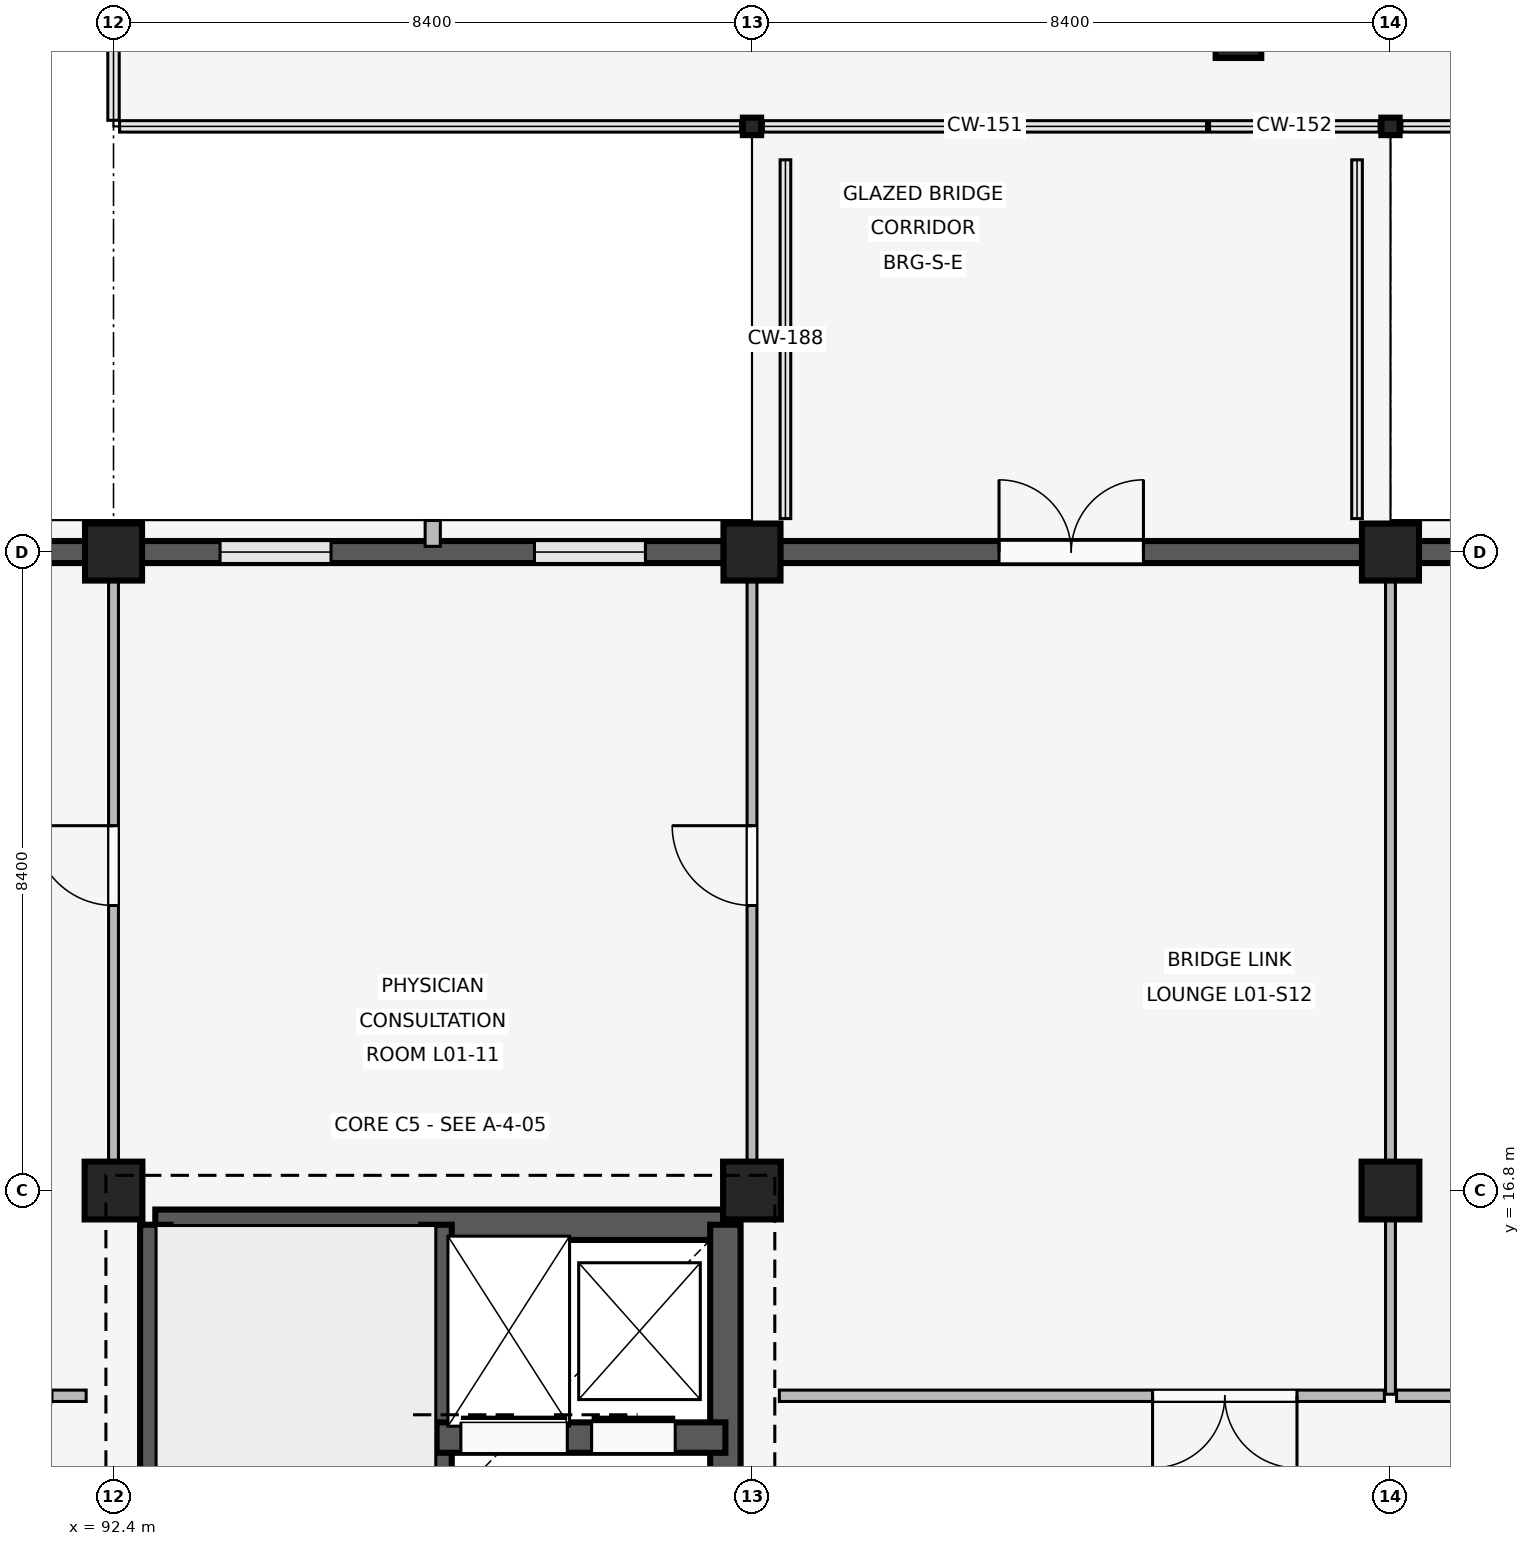
"""IFC4 building model, lengths in metres.
Left out: names, types, materials, properties, quantities, classifications, styles, units other than length and angle.
Written with IfcOpenShell. Run it as: python <this file> out.ifc"""

import sys

from ifc_helpers import new_model, si_unit, direction, frame, frame_2d, origin, origin_2d, place, context, subcontext, project, spatial, rectangle, i_section, extrude, element, fill, save


model = new_model("IFC4")
c1 = context("Model", 3, precision=1e-05, world=origin(), true_north=direction((0.0, 1.0)))
c2 = subcontext(c1, "Body", "Model", "MODEL_VIEW")
j1 = project(units=[si_unit("LENGTHUNIT", "METRE"), si_unit("PLANEANGLEUNIT", "RADIAN")], contexts=[c1])
p1 = place(None, origin())
s1 = spatial("IfcSite", under=j1, at=p1, CompositionType="ELEMENT")
p2 = place(p1, origin())
s2 = spatial("IfcBuilding", under=s1, at=p2, CompositionType="ELEMENT")
p3 = place(p2, frame((0.0, 0.0, 4.8)))
s3 = spatial("IfcBuildingStorey", under=s2, at=p3, CompositionType="ELEMENT", Elevation=4.8)
p4 = place(p3, frame((92.4, 16.8, 0.0), z_axis=(0.0, 0.0, 1.0), x_axis=(1.0, 0.0, 0.0)))
e1 = element("IfcColumn", 1, at=p4, inside=s3, PredefinedType="COLUMN", context=c2, shape_type="SweptSolid", body=[
    extrude(rectangle(XDim=0.76, YDim=0.76, at=origin_2d()), origin(), (0.0, 0.0, 1.0), 3.3),
])
p5 = place(p3, frame((92.4, 25.2, 0.0), z_axis=(0.0, 0.0, 1.0), x_axis=(1.0, 0.0, 0.0)))
e2 = element("IfcColumn", 2, at=p5, inside=s3, PredefinedType="COLUMN", context=c2, shape_type="SweptSolid", body=[
    extrude(rectangle(XDim=0.75, YDim=0.75, at=origin_2d()), origin(), (0.0, 0.0, 1.0), 3.3),
])
p6 = place(p3, frame((100.8, 16.8, 0.0), z_axis=(0.0, 0.0, 1.0), x_axis=(1.0, 0.0, 0.0)))
e3 = element("IfcColumn", 3, at=p6, inside=s3, PredefinedType="COLUMN", context=c2, shape_type="SweptSolid", body=[
    extrude(rectangle(XDim=0.76, YDim=0.76, at=origin_2d()), origin(), (0.0, 0.0, 1.0), 3.3),
])
p7 = place(p3, frame((100.8, 25.2, 0.0), z_axis=(0.0, 0.0, 1.0), x_axis=(1.0, 0.0, 0.0)))
e4 = element("IfcColumn", 4, at=p7, inside=s3, PredefinedType="COLUMN", context=c2, shape_type="SweptSolid", body=[
    extrude(rectangle(XDim=0.75, YDim=0.75, at=origin_2d()), origin(), (0.0, 0.0, 1.0), 3.3),
])
p8 = place(p3, frame((109.2, 16.8, 0.0), z_axis=(0.0, 0.0, 1.0), x_axis=(1.0, 0.0, 0.0)))
e5 = element("IfcColumn", 5, at=p8, inside=s3, PredefinedType="COLUMN", context=c2, shape_type="SweptSolid", body=[
    extrude(rectangle(XDim=0.76, YDim=0.76, at=origin_2d()), origin(), (0.0, 0.0, 1.0), 3.3),
])
p9 = place(p3, frame((109.2, 25.2, 0.0), z_axis=(0.0, 0.0, 1.0), x_axis=(1.0, 0.0, 0.0)))
e6 = element("IfcColumn", 6, at=p9, inside=s3, PredefinedType="COLUMN", context=c2, shape_type="SweptSolid", body=[
    extrude(rectangle(XDim=0.75, YDim=0.75, at=origin_2d()), origin(), (0.0, 0.0, 1.0), 3.3),
])
for number, where, z_axis, x_axis in (
    (7, (100.8, 30.8, 0.0), (0.0, 0.0, 1.0), (1.0, 0.0, 0.0)),
    (8, (109.2, 30.8, 0.0), (0.0, 0.0, 1.0), (1.0, 0.0, 0.0)),
):
    element("IfcColumn", number, at=place(p3, frame(where, z_axis=z_axis, x_axis=x_axis)), inside=s3, PredefinedType="COLUMN", context=c2, shape_type="SweptSolid", body=[
        extrude(i_section(OverallWidth=0.24, OverallDepth=0.23, WebThickness=0.008, FlangeThickness=0.012, at=origin_2d()), origin(), (0.0, 0.0, 1.0), 3.3),
    ])
p10 = place(p3, frame((107.2, 32.0, 0.0), z_axis=(0.0, 0.0, 1.0), x_axis=(1.0, 0.0, 0.0)))
e9 = element("IfcColumn", 9, at=p10, inside=s3, PredefinedType="COLUMN", context=c2, shape_type="SweptSolid", body=[
    extrude(rectangle(XDim=0.6, YDim=0.6, at=origin_2d()), origin(), (0.0, 0.0, 1.0), 3.3),
])
p11 = place(p3, frame((84.37, 25.2, 0.0), z_axis=(0.0, 0.0, 1.0), x_axis=(1.0, 0.0, 0.0)))
e10 = element("IfcWall", 10, at=p11, inside=s3, PredefinedType="SOLIDWALL", context=c2, shape_type="SweptSolid", body=[
    extrude(rectangle(XDim=7.66, YDim=0.29, at=frame_2d((3.83, 0.0))), origin(), (0.0, 0.0, 1.0), 2.42),
])
p12 = place(p11, frame((0.952, 0.0, 0.85)))
e11 = element("IfcOpeningElement", 11, at=p12, cuts=e10, PredefinedType="OPENING", context=c2, shape_type="SweptSolid", body=[
    extrude(rectangle(XDim=1.62, YDim=0.95, at=frame_2d((0.81, 0.475))), frame((0.0, 0.155, 0.0), z_axis=(0.0, -1.0, 0.0), x_axis=(1.0, 0.0, 0.0)), (0.0, 0.0, 1.0), 0.31),
])
p13 = place(p11, frame((5.088, 0.0, 0.85)))
e12 = element("IfcOpeningElement", 12, at=p13, cuts=e10, PredefinedType="OPENING", context=c2, shape_type="SweptSolid", body=[
    extrude(rectangle(XDim=1.62, YDim=0.95, at=frame_2d((0.81, 0.475))), frame((0.0, 0.155, 0.0), z_axis=(0.0, -1.0, 0.0), x_axis=(1.0, 0.0, 0.0)), (0.0, 0.0, 1.0), 0.31),
])
p14 = place(p3, frame((92.77, 25.2, 0.0), z_axis=(0.0, 0.0, 1.0), x_axis=(1.0, 0.0, 0.0)))
e13 = element("IfcWall", 13, at=p14, inside=s3, PredefinedType="SOLIDWALL", context=c2, shape_type="SweptSolid", body=[
    extrude(rectangle(XDim=7.66, YDim=0.29, at=frame_2d((3.83, 0.0))), origin(), (0.0, 0.0, 1.0), 2.42),
])
p15 = place(p14, frame((1.032, 0.0, 0.85)))
e14 = element("IfcOpeningElement", 14, at=p15, cuts=e13, PredefinedType="OPENING", context=c2, shape_type="SweptSolid", body=[
    extrude(rectangle(XDim=1.46, YDim=0.85, at=frame_2d((0.73, 0.425))), frame((0.0, 0.155, 0.0), z_axis=(0.0, -1.0, 0.0), x_axis=(1.0, 0.0, 0.0)), (0.0, 0.0, 1.0), 0.31),
])
p16 = place(p14, frame((5.168, 0.0, 0.85)))
e15 = element("IfcOpeningElement", 15, at=p16, cuts=e13, PredefinedType="OPENING", context=c2, shape_type="SweptSolid", body=[
    extrude(rectangle(XDim=1.46, YDim=0.85, at=frame_2d((0.73, 0.425))), frame((0.0, 0.155, 0.0), z_axis=(0.0, -1.0, 0.0), x_axis=(1.0, 0.0, 0.0)), (0.0, 0.0, 1.0), 0.31),
])
p17 = place(p3, frame((96.6, 25.275, 0.0), z_axis=(0.0, 0.0, 1.0), x_axis=(0.0, 1.0, 0.0)))
e16 = element("IfcWall", 16, at=p17, inside=s3, PredefinedType="ELEMENTEDWALL", context=c2, shape_type="SweptSolid", body=[
    extrude(rectangle(XDim=0.34, YDim=0.2, at=frame_2d((0.17, 0.0))), origin(), (0.0, 0.0, 1.0), 2.4),
])
p18 = place(p3, frame((101.17, 25.2, 0.0), z_axis=(0.0, 0.0, 1.0), x_axis=(1.0, 0.0, 0.0)))
e17 = element("IfcWall", 17, at=p18, inside=s3, PredefinedType="SOLIDWALL", context=c2, shape_type="SweptSolid", body=[
    extrude(rectangle(XDim=7.66, YDim=0.29, at=frame_2d((3.83, 0.0))), origin(), (0.0, 0.0, 1.0), 2.42),
])
p19 = place(p18, frame((2.88, 0.0, 0.0)))
e18 = element("IfcOpeningElement", 18, at=p19, cuts=e17, PredefinedType="OPENING", context=c2, shape_type="SweptSolid", body=[
    extrude(rectangle(XDim=1.9, YDim=2.3, at=frame_2d((0.95, 1.15))), frame((0.0, 0.155, 0.0), z_axis=(0.0, -1.0, 0.0), x_axis=(1.0, 0.0, 0.0)), (0.0, 0.0, 1.0), 0.31),
])
p20 = place(p3, frame((109.57, 25.2, 0.0), z_axis=(0.0, 0.0, 1.0), x_axis=(1.0, 0.0, 0.0)))
e19 = element("IfcWall", 19, at=p20, inside=s3, PredefinedType="SOLIDWALL", context=c2, shape_type="SweptSolid", body=[
    extrude(rectangle(XDim=7.66, YDim=0.29, at=frame_2d((3.83, 0.0))), origin(), (0.0, 0.0, 1.0), 2.42),
])
p21 = place(p20, frame((1.032, 0.0, 0.85)))
e20 = element("IfcOpeningElement", 20, at=p21, cuts=e19, PredefinedType="OPENING", context=c2, shape_type="SweptSolid", body=[
    extrude(rectangle(XDim=1.46, YDim=0.85, at=frame_2d((0.73, 0.425))), frame((0.0, 0.155, 0.0), z_axis=(0.0, -1.0, 0.0), x_axis=(1.0, 0.0, 0.0)), (0.0, 0.0, 1.0), 0.31),
])
p22 = place(p20, frame((5.168, 0.0, 0.85)))
e21 = element("IfcOpeningElement", 21, at=p22, cuts=e19, PredefinedType="OPENING", context=c2, shape_type="SweptSolid", body=[
    extrude(rectangle(XDim=1.46, YDim=0.85, at=frame_2d((0.73, 0.425))), frame((0.0, 0.155, 0.0), z_axis=(0.0, -1.0, 0.0), x_axis=(1.0, 0.0, 0.0)), (0.0, 0.0, 1.0), 0.31),
])
p23 = place(p3, frame((92.95, 16.35, 0.0), z_axis=(0.0, 0.0, 1.0), x_axis=(1.0, 0.0, 0.0)))
e22 = element("IfcWall", 22, at=p23, inside=s3, PredefinedType="SHEAR", context=c2, shape_type="SweptSolid", body=[
    extrude(rectangle(XDim=7.5, YDim=0.4, at=frame_2d((3.75, 0.0))), origin(), (0.0, 0.0, 1.0), 3.02),
])
p24 = place(p3, frame((92.95, 8.8, 0.0), z_axis=(0.0, 0.0, 1.0), x_axis=(0.0, 1.0, 0.0)))
e23 = element("IfcWall", 23, at=p24, inside=s3, PredefinedType="SHEAR", context=c2, shape_type="SweptSolid", body=[
    extrude(rectangle(XDim=7.55, YDim=0.4, at=frame_2d((3.775, 0.0))), origin(), (0.0, 0.0, 1.0), 3.02),
])
p25 = place(p24, frame((0.28, 0.0, 0.0)))
e24 = element("IfcOpeningElement", 24, at=p25, cuts=e23, PredefinedType="OPENING", context=c2, shape_type="SweptSolid", body=[
    extrude(rectangle(XDim=1.0, YDim=2.15, at=frame_2d((0.5, 1.075))), frame((0.0, 0.21, 0.0), z_axis=(0.0, -1.0, 0.0), x_axis=(1.0, 0.0, 0.0)), (0.0, 0.0, 1.0), 0.42),
])
p26 = place(p3, frame((100.45, 8.8, 0.0), z_axis=(0.0, 0.0, 1.0), x_axis=(0.0, 1.0, 0.0)))
e25 = element("IfcWall", 25, at=p26, inside=s3, PredefinedType="SHEAR", context=c2, shape_type="SweptSolid", body=[
    extrude(rectangle(XDim=7.55, YDim=0.4, at=frame_2d((3.775, 0.0))), origin(), (0.0, 0.0, 1.0), 3.02),
])
p27 = place(p26, frame((2.4, 0.0, 0.0)))
e26 = element("IfcOpeningElement", 26, at=p27, cuts=e25, PredefinedType="OPENING", context=c2, shape_type="SweptSolid", body=[
    extrude(rectangle(XDim=1.2, YDim=2.2, at=frame_2d((0.6, 1.1))), frame((0.0, 0.21, 0.0), z_axis=(0.0, -1.0, 0.0), x_axis=(1.0, 0.0, 0.0)), (0.0, 0.0, 1.0), 0.42),
])
p28 = place(p3, frame((96.65, 8.8, 0.0), z_axis=(0.0, 0.0, 1.0), x_axis=(0.0, 1.0, 0.0)))
e27 = element("IfcWall", 27, at=p28, inside=s3, PredefinedType="SHEAR", context=c2, shape_type="SweptSolid", body=[
    extrude(rectangle(XDim=7.55, YDim=0.4, at=frame_2d((3.775, 0.0))), origin(), (0.0, 0.0, 1.0), 3.02),
])
p29 = place(p28, frame((0.28, 0.0, 0.0)))
e28 = element("IfcOpeningElement", 28, at=p29, cuts=e27, PredefinedType="OPENING", context=c2, shape_type="SweptSolid", body=[
    extrude(rectangle(XDim=1.0, YDim=2.15, at=frame_2d((0.5, 1.075))), frame((0.0, 0.21, 0.0), z_axis=(0.0, -1.0, 0.0), x_axis=(1.0, 0.0, 0.0)), (0.0, 0.0, 1.0), 0.42),
])
p30 = place(p3, frame((96.65, 13.55, 0.0), z_axis=(0.0, 0.0, 1.0), x_axis=(1.0, 0.0, 0.0)))
e29 = element("IfcWall", 29, at=p30, inside=s3, PredefinedType="SHEAR", context=c2, shape_type="SweptSolid", body=[
    extrude(rectangle(XDim=3.8, YDim=0.4, at=frame_2d((1.9, 0.0))), origin(), (0.0, 0.0, 1.0), 3.02),
])
p31 = place(p30, frame((0.32, 0.0, 0.0)))
e30 = element("IfcOpeningElement", 30, at=p31, cuts=e29, PredefinedType="OPENING", context=c2, shape_type="SweptSolid", body=[
    extrude(rectangle(XDim=1.4, YDim=2.25, at=frame_2d((0.7, 1.125))), frame((0.0, 0.21, 0.0), z_axis=(0.0, -1.0, 0.0), x_axis=(1.0, 0.0, 0.0)), (0.0, 0.0, 1.0), 0.42),
])
p32 = place(p30, frame((2.04, 0.0, 0.0)))
e31 = element("IfcOpeningElement", 31, at=p32, cuts=e29, PredefinedType="OPENING", context=c2, shape_type="SweptSolid", body=[
    extrude(rectangle(XDim=1.1, YDim=2.15, at=frame_2d((0.55, 1.075))), frame((0.0, 0.21, 0.0), z_axis=(0.0, -1.0, 0.0), x_axis=(1.0, 0.0, 0.0)), (0.0, 0.0, 1.0), 0.42),
])
p33 = place(p3, frame((92.04, 14.1, 0.0), z_axis=(0.0, 0.0, 1.0), x_axis=(-1.0, 0.0, 0.0)))
e32 = element("IfcWall", 32, at=p33, inside=s3, PredefinedType="PARTITIONING", context=c2, shape_type="SweptSolid", body=[
    extrude(rectangle(XDim=7.96, YDim=0.15, at=frame_2d((3.98, 0.0))), origin(), (0.0, 0.0, 1.0), 2.4),
])
p34 = place(p33, frame((0.45, 0.0, 0.0)))
e33 = element("IfcOpeningElement", 33, at=p34, cuts=e32, PredefinedType="OPENING", context=c2, shape_type="SweptSolid", body=[
    extrude(rectangle(XDim=1.0, YDim=2.15, at=frame_2d((0.5, 1.075))), frame((0.0, 0.085, 0.0), z_axis=(0.0, -1.0, 0.0), x_axis=(1.0, 0.0, 0.0)), (0.0, 0.0, 1.0), 0.17),
])
p35 = place(p33, frame((4.15, 0.0, 0.0)))
e34 = element("IfcOpeningElement", 34, at=p35, cuts=e32, PredefinedType="OPENING", context=c2, shape_type="SweptSolid", body=[
    extrude(rectangle(XDim=1.0, YDim=2.15, at=frame_2d((0.5, 1.075))), frame((0.0, 0.085, 0.0), z_axis=(0.0, -1.0, 0.0), x_axis=(1.0, 0.0, 0.0)), (0.0, 0.0, 1.0), 0.17),
])
p36 = place(p3, frame((92.4, 17.15, 0.0), z_axis=(0.0, 0.0, 1.0), x_axis=(0.0, 1.0, 0.0)))
e35 = element("IfcWall", 35, at=p36, inside=s3, PredefinedType="PARTITIONING", context=c2, shape_type="SweptSolid", body=[
    extrude(rectangle(XDim=7.91, YDim=0.13, at=frame_2d((3.955, 0.0))), origin(), (0.0, 0.0, 1.0), 2.4),
])
p37 = place(p36, frame((3.4, 0.0, 0.0)))
e36 = element("IfcOpeningElement", 36, at=p37, cuts=e35, PredefinedType="OPENING", context=c2, shape_type="SweptSolid", body=[
    extrude(rectangle(XDim=1.05, YDim=2.2, at=frame_2d((0.525, 1.1))), frame((0.0, 0.075, 0.0), z_axis=(0.0, -1.0, 0.0), x_axis=(1.0, 0.0, 0.0)), (0.0, 0.0, 1.0), 0.15),
])
p38 = place(p3, frame((100.8, 17.15, 0.0), z_axis=(0.0, 0.0, 1.0), x_axis=(0.0, 1.0, 0.0)))
e37 = element("IfcWall", 37, at=p38, inside=s3, PredefinedType="PARTITIONING", context=c2, shape_type="SweptSolid", body=[
    extrude(rectangle(XDim=7.91, YDim=0.13, at=frame_2d((3.955, 0.0))), origin(), (0.0, 0.0, 1.0), 2.4),
])
p39 = place(p38, frame((3.4, 0.0, 0.0)))
e38 = element("IfcOpeningElement", 38, at=p39, cuts=e37, PredefinedType="OPENING", context=c2, shape_type="SweptSolid", body=[
    extrude(rectangle(XDim=1.05, YDim=2.2, at=frame_2d((0.525, 1.1))), frame((0.0, 0.075, 0.0), z_axis=(0.0, -1.0, 0.0), x_axis=(1.0, 0.0, 0.0)), (0.0, 0.0, 1.0), 0.15),
])
p40 = place(p3, frame((109.12, 14.1, 0.0), z_axis=(0.0, 0.0, 1.0), x_axis=(-1.0, 0.0, 0.0)))
e39 = element("IfcWall", 39, at=p40, inside=s3, PredefinedType="PARTITIONING", context=c2, shape_type="SweptSolid", body=[
    extrude(rectangle(XDim=7.96, YDim=0.15, at=frame_2d((3.98, 0.0))), origin(), (0.0, 0.0, 1.0), 2.4),
])
p41 = place(p40, frame((1.15, 0.0, 0.0)))
e40 = element("IfcOpeningElement", 40, at=p41, cuts=e39, PredefinedType="OPENING", context=c2, shape_type="SweptSolid", body=[
    extrude(rectangle(XDim=1.9, YDim=2.3, at=frame_2d((0.95, 1.15))), frame((0.0, 0.085, 0.0), z_axis=(0.0, -1.0, 0.0), x_axis=(1.0, 0.0, 0.0)), (0.0, 0.0, 1.0), 0.17),
])
p42 = place(p3, frame((109.2, 14.12, 0.0), z_axis=(0.0, 0.0, 1.0), x_axis=(0.0, 1.0, 0.0)))
e41 = element("IfcWall", 41, at=p42, inside=s3, PredefinedType="PARTITIONING", context=c2, shape_type="SweptSolid", body=[
    extrude(rectangle(XDim=10.94, YDim=0.13, at=frame_2d((5.47, 0.0))), origin(), (0.0, 0.0, 1.0), 2.4),
])
p43 = place(p3, frame((117.52, 14.1, 0.0), z_axis=(0.0, 0.0, 1.0), x_axis=(-1.0, 0.0, 0.0)))
e42 = element("IfcWall", 42, at=p43, inside=s3, PredefinedType="PARTITIONING", context=c2, shape_type="SweptSolid", body=[
    extrude(rectangle(XDim=8.24, YDim=0.15, at=frame_2d((4.12, 0.0))), origin(), (0.0, 0.0, 1.0), 2.4),
])
p44 = place(p43, frame((3.57, 0.0, 0.0)))
e43 = element("IfcOpeningElement", 43, at=p44, cuts=e42, PredefinedType="OPENING", context=c2, shape_type="SweptSolid", body=[
    extrude(rectangle(XDim=1.1, YDim=2.2, at=frame_2d((0.55, 1.1))), frame((0.0, 0.085, 0.0), z_axis=(0.0, -1.0, 0.0), x_axis=(1.0, 0.0, 0.0)), (0.0, 0.0, 1.0), 0.17),
])
p45 = place(p15, origin())
e44 = element("IfcWindow", 44, at=p45, inside=s3, PartitioningType="SINGLE_PANEL", PredefinedType="WINDOW", context=c2, shape_type="SweptSolid", body=[
    extrude(rectangle(XDim=1.46, YDim=0.85, at=frame_2d((0.73, 0.425))), frame((0.0, 0.03, 0.0), z_axis=(0.0, -1.0, 0.0), x_axis=(1.0, 0.0, 0.0)), (0.0, 0.0, 1.0), 0.06),
])
fill(e14, e44)
p46 = place(p16, origin())
e45 = element("IfcWindow", 45, at=p46, inside=s3, PartitioningType="SINGLE_PANEL", PredefinedType="WINDOW", context=c2, shape_type="SweptSolid", body=[
    extrude(rectangle(XDim=1.46, YDim=0.85, at=frame_2d((0.73, 0.425))), frame((0.0, 0.03, 0.0), z_axis=(0.0, -1.0, 0.0), x_axis=(1.0, 0.0, 0.0)), (0.0, 0.0, 1.0), 0.06),
])
fill(e15, e45)
p47 = place(p19, origin())
e46 = element("IfcDoor", 46, at=p47, inside=s3, OperationType="DOUBLE_SWING_LEFT", PredefinedType="DOOR", context=c2, shape_type="SweptSolid", body=[
    extrude(rectangle(XDim=1.9, YDim=2.3, at=frame_2d((0.95, 1.15))), frame((0.0, 0.025, 0.0), z_axis=(0.0, -1.0, 0.0), x_axis=(1.0, 0.0, 0.0)), (0.0, 0.0, 1.0), 0.05),
])
fill(e18, e46)
p48 = place(p31, origin())
e47 = element("IfcDoor", 47, at=p48, inside=s3, OperationType="SLIDING_TO_LEFT", PredefinedType="DOOR", context=c2, shape_type="SweptSolid", body=[
    extrude(rectangle(XDim=1.4, YDim=2.25, at=frame_2d((0.7, 1.125))), frame((0.0, 0.025, 0.0), z_axis=(0.0, -1.0, 0.0), x_axis=(1.0, 0.0, 0.0)), (0.0, 0.0, 1.0), 0.05),
])
fill(e30, e47)
p49 = place(p32, origin())
e48 = element("IfcDoor", 48, at=p49, inside=s3, OperationType="SLIDING_TO_LEFT", PredefinedType="DOOR", context=c2, shape_type="SweptSolid", body=[
    extrude(rectangle(XDim=1.1, YDim=2.15, at=frame_2d((0.55, 1.075))), frame((0.0, 0.025, 0.0), z_axis=(0.0, -1.0, 0.0), x_axis=(1.0, 0.0, 0.0)), (0.0, 0.0, 1.0), 0.05),
])
fill(e31, e48)
p50 = place(p37, origin())
e49 = element("IfcDoor", 49, at=p50, inside=s3, OperationType="SINGLE_SWING_RIGHT", PredefinedType="DOOR", context=c2, shape_type="SweptSolid", body=[
    extrude(rectangle(XDim=1.05, YDim=2.2, at=frame_2d((0.525, 1.1))), frame((0.0, 0.025, 0.0), z_axis=(0.0, -1.0, 0.0), x_axis=(1.0, 0.0, 0.0)), (0.0, 0.0, 1.0), 0.05),
])
fill(e36, e49)
p51 = place(p39, origin())
e50 = element("IfcDoor", 50, at=p51, inside=s3, OperationType="SINGLE_SWING_RIGHT", PredefinedType="DOOR", context=c2, shape_type="SweptSolid", body=[
    extrude(rectangle(XDim=1.05, YDim=2.2, at=frame_2d((0.525, 1.1))), frame((0.0, 0.025, 0.0), z_axis=(0.0, -1.0, 0.0), x_axis=(1.0, 0.0, 0.0)), (0.0, 0.0, 1.0), 0.05),
])
fill(e38, e50)
p52 = place(p41, origin())
e51 = element("IfcDoor", 51, at=p52, inside=s3, OperationType="DOUBLE_SWING_LEFT", PredefinedType="DOOR", context=c2, shape_type="SweptSolid", body=[
    extrude(rectangle(XDim=1.9, YDim=2.3, at=frame_2d((0.95, 1.15))), frame((0.0, 0.025, 0.0), z_axis=(0.0, -1.0, 0.0), x_axis=(1.0, 0.0, 0.0)), (0.0, 0.0, 1.0), 0.05),
])
fill(e40, e51)
save(model, sys.argv[1])
